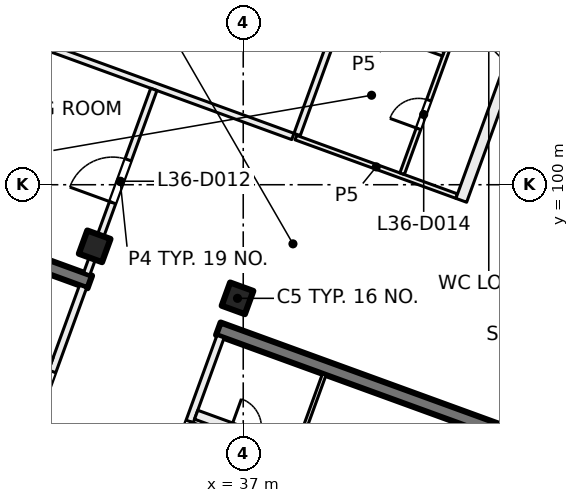
"""IFC4 building model, lengths in metres.
Left out: names, types, materials, properties, quantities, classifications, styles, units other than length and angle.
Written with IfcOpenShell. Run it as: python <this file> out.ifc"""

import sys

from ifc_helpers import new_model, si_unit, direction, frame, frame_2d, origin, origin_2d, place, context, subcontext, project, spatial, rectangle, extrude, element, fill, save


model = new_model("IFC4")
c1 = context("Model", 3, precision=1e-05, world=origin(), true_north=direction((0.0, 1.0)))
c2 = subcontext(c1, "Body", "Model", "MODEL_VIEW")
j1 = project(units=[si_unit("LENGTHUNIT", "METRE"), si_unit("PLANEANGLEUNIT", "RADIAN")], contexts=[c1])
p1 = place(None, origin())
s1 = spatial("IfcSite", under=j1, at=p1, CompositionType="ELEMENT")
p2 = place(p1, origin())
s2 = spatial("IfcBuilding", under=s1, at=p2, CompositionType="ELEMENT")
p3 = place(p2, frame((0.0, 0.0, 154.5)))
s3 = spatial("IfcBuildingStorey", under=s2, at=p3, CompositionType="ELEMENT", Elevation=154.5)
for number, where, z_axis, x_axis in (
    (1, (36.849, 97.011, 0.0), (0.0, 0.0, 1.0), (-0.342, -0.94, 0.0)),
    (2, (33.091, 98.379, 0.0), (0.0, 0.0, 1.0), (-0.342, -0.94, 0.0)),
):
    element("IfcColumn", number, at=place(p3, frame(where, z_axis=z_axis, x_axis=x_axis)), inside=s3, PredefinedType="COLUMN", context=c2, shape_type="SweptSolid", body=[
        extrude(rectangle(XDim=0.65, YDim=0.65, at=origin_2d()), origin(), (0.0, 0.0, 1.0), 4.0),
    ])
p4 = place(p3, frame((41.85, 85.241, 0.0), z_axis=(0.0, 0.0, 1.0), x_axis=(0.34201902012, 0.939693029598, 0.0)))
e3 = element("IfcWall", 3, at=p4, inside=s3, PredefinedType="SHEAR", context=c2, shape_type="SweptSolid", body=[
    extrude(rectangle(XDim=8.95, YDim=0.55, at=frame_2d((4.475, 0.0))), origin(), (0.0, 0.0, 1.0), 4.0),
])
p5 = place(p3, frame((44.473, 93.251, 0.0), z_axis=(0.0, 0.0, 1.0), x_axis=(-0.939692847377, 0.34201952077, 0.0)))
e4 = element("IfcWall", 4, at=p5, inside=s3, PredefinedType="SHEAR", context=c2, shape_type="SweptSolid", body=[
    extrude(rectangle(XDim=8.65, YDim=0.35, at=frame_2d((4.325, 0.0))), origin(), (0.0, 0.0, 1.0), 4.0),
])
p6 = place(p3, frame((32.962, 97.441, 0.0), z_axis=(0.0, 0.0, 1.0), x_axis=(-0.939689545667, 0.342028592028, 0.0)))
e5 = element("IfcWall", 5, at=p6, inside=s3, PredefinedType="SHEAR", context=c2, shape_type="SweptSolid", body=[
    extrude(rectangle(XDim=8.65, YDim=0.35, at=frame_2d((4.325, 0.0))), origin(), (0.0, 0.0, 1.0), 4.0),
])
p7 = place(p3, frame((24.666, 100.669, 0.0), z_axis=(0.0, 0.0, 1.0), x_axis=(0.34201964167, 0.939692803373, 0.0)))
e6 = element("IfcWall", 6, at=p7, inside=s3, PredefinedType="SOLIDWALL", context=c2, shape_type="SweptSolid", body=[
    extrude(rectangle(XDim=32.884, YDim=0.6, at=frame_2d((16.442, 0.0))), origin(), (0.0, 0.0, 1.0), 3.625),
])
p8 = place(p7, frame((1.48, 0.0, 0.9)))
e7 = element("IfcOpeningElement", 7, at=p8, cuts=e6, PredefinedType="OPENING", context=c2, shape_type="SweptSolid", body=[
    extrude(rectangle(XDim=3.0, YDim=2.4, at=frame_2d((1.5, 1.2))), frame((0.0, 0.31, 0.0), z_axis=(0.0, -1.0, 0.0), x_axis=(1.0, 0.0, 0.0)), (0.0, 0.0, 1.0), 0.62),
])
p9 = place(p7, frame((5.98, 0.0, 0.9)))
e8 = element("IfcOpeningElement", 8, at=p9, cuts=e6, PredefinedType="OPENING", context=c2, shape_type="SweptSolid", body=[
    extrude(rectangle(XDim=3.0, YDim=2.4, at=frame_2d((1.5, 1.2))), frame((0.0, 0.31, 0.0), z_axis=(0.0, -1.0, 0.0), x_axis=(1.0, 0.0, 0.0)), (0.0, 0.0, 1.0), 0.62),
])
p10 = place(p7, frame((10.48, 0.0, 0.9)))
e9 = element("IfcOpeningElement", 9, at=p10, cuts=e6, PredefinedType="OPENING", context=c2, shape_type="SweptSolid", body=[
    extrude(rectangle(XDim=3.0, YDim=2.4, at=frame_2d((1.5, 1.2))), frame((0.0, 0.31, 0.0), z_axis=(0.0, -1.0, 0.0), x_axis=(1.0, 0.0, 0.0)), (0.0, 0.0, 1.0), 0.62),
])
p11 = place(p7, frame((14.98, 0.0, 0.9)))
e10 = element("IfcOpeningElement", 10, at=p11, cuts=e6, PredefinedType="OPENING", context=c2, shape_type="SweptSolid", body=[
    extrude(rectangle(XDim=3.0, YDim=2.4, at=frame_2d((1.5, 1.2))), frame((0.0, 0.31, 0.0), z_axis=(0.0, -1.0, 0.0), x_axis=(1.0, 0.0, 0.0)), (0.0, 0.0, 1.0), 0.62),
])
p12 = place(p7, frame((20.08, 0.0, 0.0)))
e11 = element("IfcOpeningElement", 11, at=p12, cuts=e6, PredefinedType="OPENING", context=c2, shape_type="SweptSolid", body=[
    extrude(rectangle(XDim=1.8, YDim=2.4, at=frame_2d((0.9, 1.2))), frame((0.0, 0.31, 0.0), z_axis=(0.0, -1.0, 0.0), x_axis=(1.0, 0.0, 0.0)), (0.0, 0.0, 1.0), 0.62),
])
p13 = place(p7, frame((23.98, 0.0, 0.9)))
e12 = element("IfcOpeningElement", 12, at=p13, cuts=e6, PredefinedType="OPENING", context=c2, shape_type="SweptSolid", body=[
    extrude(rectangle(XDim=3.0, YDim=2.4, at=frame_2d((1.5, 1.2))), frame((0.0, 0.31, 0.0), z_axis=(0.0, -1.0, 0.0), x_axis=(1.0, 0.0, 0.0)), (0.0, 0.0, 1.0), 0.62),
])
p14 = place(p7, frame((28.48, 0.0, 0.9)))
e13 = element("IfcOpeningElement", 13, at=p14, cuts=e6, PredefinedType="OPENING", context=c2, shape_type="SweptSolid", body=[
    extrude(rectangle(XDim=3.0, YDim=2.4, at=frame_2d((1.5, 1.2))), frame((0.0, 0.31, 0.0), z_axis=(0.0, -1.0, 0.0), x_axis=(1.0, 0.0, 0.0)), (0.0, 0.0, 1.0), 0.62),
])
p15 = place(p3, frame((31.459, 93.678, 0.0), z_axis=(0.0, 0.0, 1.0), x_axis=(0.341985870128, 0.939705094502, 0.0)))
e14 = element("IfcWall", 14, at=p15, inside=s3, PredefinedType="PARTITIONING", context=c2, shape_type="SweptSolid", body=[
    extrude(rectangle(XDim=3.875, YDim=0.2, at=frame_2d((1.938, 0.0))), origin(), (0.0, 0.0, 1.0), 3.625),
])
p16 = place(p15, frame((0.3, 0.0, 0.0)))
e15 = element("IfcOpeningElement", 15, at=p16, cuts=e14, PredefinedType="OPENING", context=c2, shape_type="SweptSolid", body=[
    extrude(rectangle(XDim=1.2, YDim=2.1, at=frame_2d((0.6, 1.05))), frame((0.0, 0.11, 0.0), z_axis=(0.0, -1.0, 0.0), x_axis=(1.0, 0.0, 0.0)), (0.0, 0.0, 1.0), 0.22),
])
p17 = place(p3, frame((24.039, 98.215, 0.0), z_axis=(0.0, 0.0, 1.0), x_axis=(0.939687617333, -0.342033889887, 0.0)))
e16 = element("IfcWall", 16, at=p17, inside=s3, PredefinedType="PARTITIONING", context=c2, shape_type="SweptSolid", body=[
    extrude(rectangle(XDim=8.425, YDim=0.25, at=frame_2d((4.212, 0.0))), origin(), (0.0, 0.0, 1.0), 3.625),
])
p18 = place(p17, frame((5.942, 0.0, 0.0)))
e17 = element("IfcOpeningElement", 17, at=p18, cuts=e16, PredefinedType="OPENING", context=c2, shape_type="SweptSolid", body=[
    extrude(rectangle(XDim=0.8, YDim=2.1, at=frame_2d((0.4, 1.05))), frame((0.0, 0.135, 0.0), z_axis=(0.0, -1.0, 0.0), x_axis=(1.0, 0.0, 0.0)), (0.0, 0.0, 1.0), 0.27),
])
p19 = place(p17, frame((1.68, 0.0, 0.0)))
e18 = element("IfcOpeningElement", 18, at=p19, cuts=e16, PredefinedType="OPENING", context=c2, shape_type="SweptSolid", body=[
    extrude(rectangle(XDim=0.8, YDim=2.1, at=frame_2d((0.4, 1.05))), frame((0.0, 0.135, 0.0), z_axis=(0.0, -1.0, 0.0), x_axis=(1.0, 0.0, 0.0)), (0.0, 0.0, 1.0), 0.27),
])
p20 = place(p3, frame((36.403, 96.003, 0.0), z_axis=(0.0, 0.0, 1.0), x_axis=(-0.342041503764, -0.939684845947, 0.0)))
e19 = element("IfcWall", 19, at=p20, inside=s3, PredefinedType="PARTITIONING", context=c2, shape_type="SweptSolid", body=[
    extrude(rectangle(XDim=3.875, YDim=0.2, at=frame_2d((1.938, 0.0))), origin(), (0.0, 0.0, 1.0), 3.625),
])
p21 = place(p20, frame((2.375, 0.0, 0.0)))
e20 = element("IfcOpeningElement", 20, at=p21, cuts=e19, PredefinedType="OPENING", context=c2, shape_type="SweptSolid", body=[
    extrude(rectangle(XDim=1.2, YDim=2.1, at=frame_2d((0.6, 1.05))), frame((0.0, 0.11, 0.0), z_axis=(0.0, -1.0, 0.0), x_axis=(1.0, 0.0, 0.0)), (0.0, 0.0, 1.0), 0.22),
])
p22 = place(p3, frame((35.761, 93.948, 0.0), z_axis=(0.0, 0.0, 1.0), x_axis=(0.93969693093, -0.342008301071, 0.0)))
e21 = element("IfcWall", 21, at=p22, inside=s3, PredefinedType="PARTITIONING", context=c2, shape_type="SweptSolid", body=[
    extrude(rectangle(XDim=8.425, YDim=0.25, at=frame_2d((4.212, 0.0))), origin(), (0.0, 0.0, 1.0), 3.625),
])
p23 = place(p22, frame((0.978, 0.0, 0.0)))
e22 = element("IfcOpeningElement", 22, at=p23, cuts=e21, PredefinedType="OPENING", context=c2, shape_type="SweptSolid", body=[
    extrude(rectangle(XDim=0.8, YDim=2.1, at=frame_2d((0.4, 1.05))), frame((0.0, 0.135, 0.0), z_axis=(0.0, -1.0, 0.0), x_axis=(1.0, 0.0, 0.0)), (0.0, 0.0, 1.0), 0.27),
])
p24 = place(p22, frame((5.24, 0.0, 0.0)))
e23 = element("IfcOpeningElement", 23, at=p24, cuts=e21, PredefinedType="OPENING", context=c2, shape_type="SweptSolid", body=[
    extrude(rectangle(XDim=0.8, YDim=2.1, at=frame_2d((0.4, 1.05))), frame((0.0, 0.135, 0.0), z_axis=(0.0, -1.0, 0.0), x_axis=(1.0, 0.0, 0.0)), (0.0, 0.0, 1.0), 0.27),
])
p25 = place(p3, frame((39.132, 95.009, 0.0), z_axis=(0.0, 0.0, 1.0), x_axis=(-0.342043138314, -0.939684250976, 0.0)))
e24 = element("IfcWall", 24, at=p25, inside=s3, PredefinedType="PARTITIONING", context=c2, shape_type="SweptSolid", body=[
    extrude(rectangle(XDim=2.025, YDim=0.1, at=frame_2d((1.012, 0.0))), origin(), (0.0, 0.0, 1.0), 3.625),
])
p26 = place(p3, frame((26.736, 105.48, 0.0), z_axis=(0.0, 0.0, 1.0), x_axis=(0.939721611154, -0.341940482438, 0.0)))
e25 = element("IfcWall", 25, at=p26, inside=s3, PredefinedType="PARTITIONING", context=c2, shape_type="SweptSolid", body=[
    extrude(rectangle(XDim=12.312, YDim=0.175, at=frame_2d((6.156, 0.0))), origin(), (0.0, 0.0, 1.0), 3.625),
])
p27 = place(p3, frame((32.881, 97.657, 0.0), z_axis=(0.0, 0.0, 1.0), x_axis=(0.342058204353, 0.939678766832, 0.0)))
e26 = element("IfcWall", 26, at=p27, inside=s3, PredefinedType="PARTITIONING", context=c2, shape_type="SweptSolid", body=[
    extrude(rectangle(XDim=5.163, YDim=0.175, at=frame_2d((2.581, 0.0))), origin(), (0.0, 0.0, 1.0), 3.625),
])
p28 = place(p27, frame((1.991, 0.0, 0.0)))
e27 = element("IfcOpeningElement", 27, at=p28, cuts=e26, PredefinedType="OPENING", context=c2, shape_type="SweptSolid", body=[
    extrude(rectangle(XDim=1.2, YDim=2.1, at=frame_2d((0.6, 1.05))), frame((0.0, 0.097, 0.0), z_axis=(0.0, -1.0, 0.0), x_axis=(1.0, 0.0, 0.0)), (0.0, 0.0, 1.0), 0.195),
])
p29 = place(p3, frame((38.385, 101.24, 0.0), z_axis=(0.0, 0.0, 1.0), x_axis=(0.939711088937, -0.341969398235, 0.0)))
e28 = element("IfcWall", 28, at=p29, inside=s3, PredefinedType="PARTITIONING", context=c2, shape_type="SweptSolid", body=[
    extrude(rectangle(XDim=4.503, YDim=0.125, at=frame_2d((2.252, 0.0))), origin(), (0.0, 0.0, 1.0), 3.625),
])
p30 = place(p3, frame((38.418, 101.322, 0.0), z_axis=(0.0, 0.0, 1.0), x_axis=(0.341987815327, 0.939704386585, 0.0)))
e29 = element("IfcWall", 29, at=p30, inside=s3, PredefinedType="PARTITIONING", context=c2, shape_type="SweptSolid", body=[
    extrude(rectangle(XDim=4.325, YDim=0.175, at=frame_2d((2.162, 0.0))), origin(), (0.0, 0.0, 1.0), 3.625),
])
p31 = place(p3, frame((41.181, 100.29, 0.0), z_axis=(0.0, 0.0, 1.0), x_axis=(0.34222012082, 0.939619810831, 0.0)))
e30 = element("IfcWall", 30, at=p31, inside=s3, PredefinedType="PARTITIONING", context=c2, shape_type="SweptSolid", body=[
    extrude(rectangle(XDim=8.875, YDim=0.125, at=frame_2d((4.438, 0.0))), origin(), (0.0, 0.0, 1.0), 3.625),
])
p32 = place(p31, frame((1.258, 0.0, 0.0)))
e31 = element("IfcOpeningElement", 31, at=p32, cuts=e30, PredefinedType="OPENING", context=c2, shape_type="SweptSolid", body=[
    extrude(rectangle(XDim=0.8, YDim=2.1, at=frame_2d((0.4, 1.05))), frame((0.0, 0.073, 0.0), z_axis=(0.0, -1.0, 0.0), x_axis=(1.0, 0.0, 0.0)), (0.0, 0.0, 1.0), 0.145),
])
p33 = place(p31, frame((4.437, 0.0, 0.0)))
e32 = element("IfcOpeningElement", 32, at=p33, cuts=e30, PredefinedType="OPENING", context=c2, shape_type="SweptSolid", body=[
    extrude(rectangle(XDim=0.8, YDim=2.1, at=frame_2d((0.4, 1.05))), frame((0.0, 0.073, 0.0), z_axis=(0.0, -1.0, 0.0), x_axis=(1.0, 0.0, 0.0)), (0.0, 0.0, 1.0), 0.145),
])
p34 = place(p31, frame((7.116, 0.0, 0.0)))
e33 = element("IfcOpeningElement", 33, at=p34, cuts=e30, PredefinedType="OPENING", context=c2, shape_type="SweptSolid", body=[
    extrude(rectangle(XDim=1.0, YDim=2.1, at=frame_2d((0.5, 1.05))), frame((0.0, 0.073, 0.0), z_axis=(0.0, -1.0, 0.0), x_axis=(1.0, 0.0, 0.0)), (0.0, 0.0, 1.0), 0.145),
])
p35 = place(p3, frame((42.264, 103.446, 0.0), z_axis=(0.0, 0.0, 1.0), x_axis=(-0.939640574808, 0.342163104635, 0.0)))
e34 = element("IfcWall", 34, at=p35, inside=s3, PredefinedType="PARTITIONING", context=c2, shape_type="SweptSolid", body=[
    extrude(rectangle(XDim=2.8, YDim=0.125, at=frame_2d((1.4, 0.0))), origin(), (0.0, 0.0, 1.0), 3.625),
])
p36 = place(p3, frame((47.325, 112.197, 0.0), z_axis=(0.0, 0.0, 1.0), x_axis=(-0.341976837053, -0.93970838185, 0.0)))
e35 = element("IfcWall", 35, at=p36, inside=s3, PredefinedType="PARTITIONING", context=c2, shape_type="SweptSolid", body=[
    extrude(rectangle(XDim=13.416, YDim=0.3, at=frame_2d((6.708, 0.0))), origin(), (0.0, 0.0, 1.0), 3.625),
])
p37 = place(p36, frame((8.354, 0.0, 0.0)))
e36 = element("IfcOpeningElement", 36, at=p37, cuts=e35, PredefinedType="OPENING", context=c2, shape_type="SweptSolid", body=[
    extrude(rectangle(XDim=1.0, YDim=2.1, at=frame_2d((0.5, 1.05))), frame((0.0, 0.16, 0.0), z_axis=(0.0, -1.0, 0.0), x_axis=(1.0, 0.0, 0.0)), (0.0, 0.0, 1.0), 0.32),
])
p38 = place(p36, frame((1.267, 0.0, 0.0)))
e37 = element("IfcOpeningElement", 37, at=p38, cuts=e35, PredefinedType="OPENING", context=c2, shape_type="SweptSolid", body=[
    extrude(rectangle(XDim=1.8, YDim=2.1, at=frame_2d((0.9, 1.05))), frame((0.0, 0.16, 0.0), z_axis=(0.0, -1.0, 0.0), x_axis=(1.0, 0.0, 0.0)), (0.0, 0.0, 1.0), 0.32),
])
p39 = place(p16, origin())
e38 = element("IfcDoor", 38, at=p39, inside=s3, OperationType="DOUBLE_DOOR_SINGLE_SWING", PredefinedType="DOOR", context=c2, shape_type="SweptSolid", body=[
    extrude(rectangle(XDim=1.2, YDim=2.1, at=frame_2d((0.6, 1.05))), frame((0.0, 0.025, 0.0), z_axis=(0.0, -1.0, 0.0), x_axis=(1.0, 0.0, 0.0)), (0.0, 0.0, 1.0), 0.05),
])
fill(e15, e38)
p40 = place(p21, origin())
e39 = element("IfcDoor", 39, at=p40, inside=s3, OperationType="DOUBLE_DOOR_SINGLE_SWING", PredefinedType="DOOR", context=c2, shape_type="SweptSolid", body=[
    extrude(rectangle(XDim=1.2, YDim=2.1, at=frame_2d((0.6, 1.05))), frame((0.0, 0.025, 0.0), z_axis=(0.0, -1.0, 0.0), x_axis=(1.0, 0.0, 0.0)), (0.0, 0.0, 1.0), 0.05),
])
fill(e20, e39)
p41 = place(p28, origin())
e40 = element("IfcDoor", 40, at=p41, inside=s3, OperationType="DOUBLE_DOOR_SINGLE_SWING", PredefinedType="DOOR", context=c2, shape_type="SweptSolid", body=[
    extrude(rectangle(XDim=1.2, YDim=2.1, at=frame_2d((0.6, 1.05))), frame((0.0, 0.025, 0.0), z_axis=(0.0, -1.0, 0.0), x_axis=(1.0, 0.0, 0.0)), (0.0, 0.0, 1.0), 0.05),
])
fill(e27, e40)
p42 = place(p32, origin())
e41 = element("IfcDoor", 41, at=p42, inside=s3, OperationType="SINGLE_SWING_LEFT", PredefinedType="DOOR", context=c2, shape_type="SweptSolid", body=[
    extrude(rectangle(XDim=0.8, YDim=2.1, at=frame_2d((0.4, 1.05))), frame((0.0, 0.025, 0.0), z_axis=(0.0, -1.0, 0.0), x_axis=(1.0, 0.0, 0.0)), (0.0, 0.0, 1.0), 0.05),
])
fill(e31, e41)
save(model, sys.argv[1])
